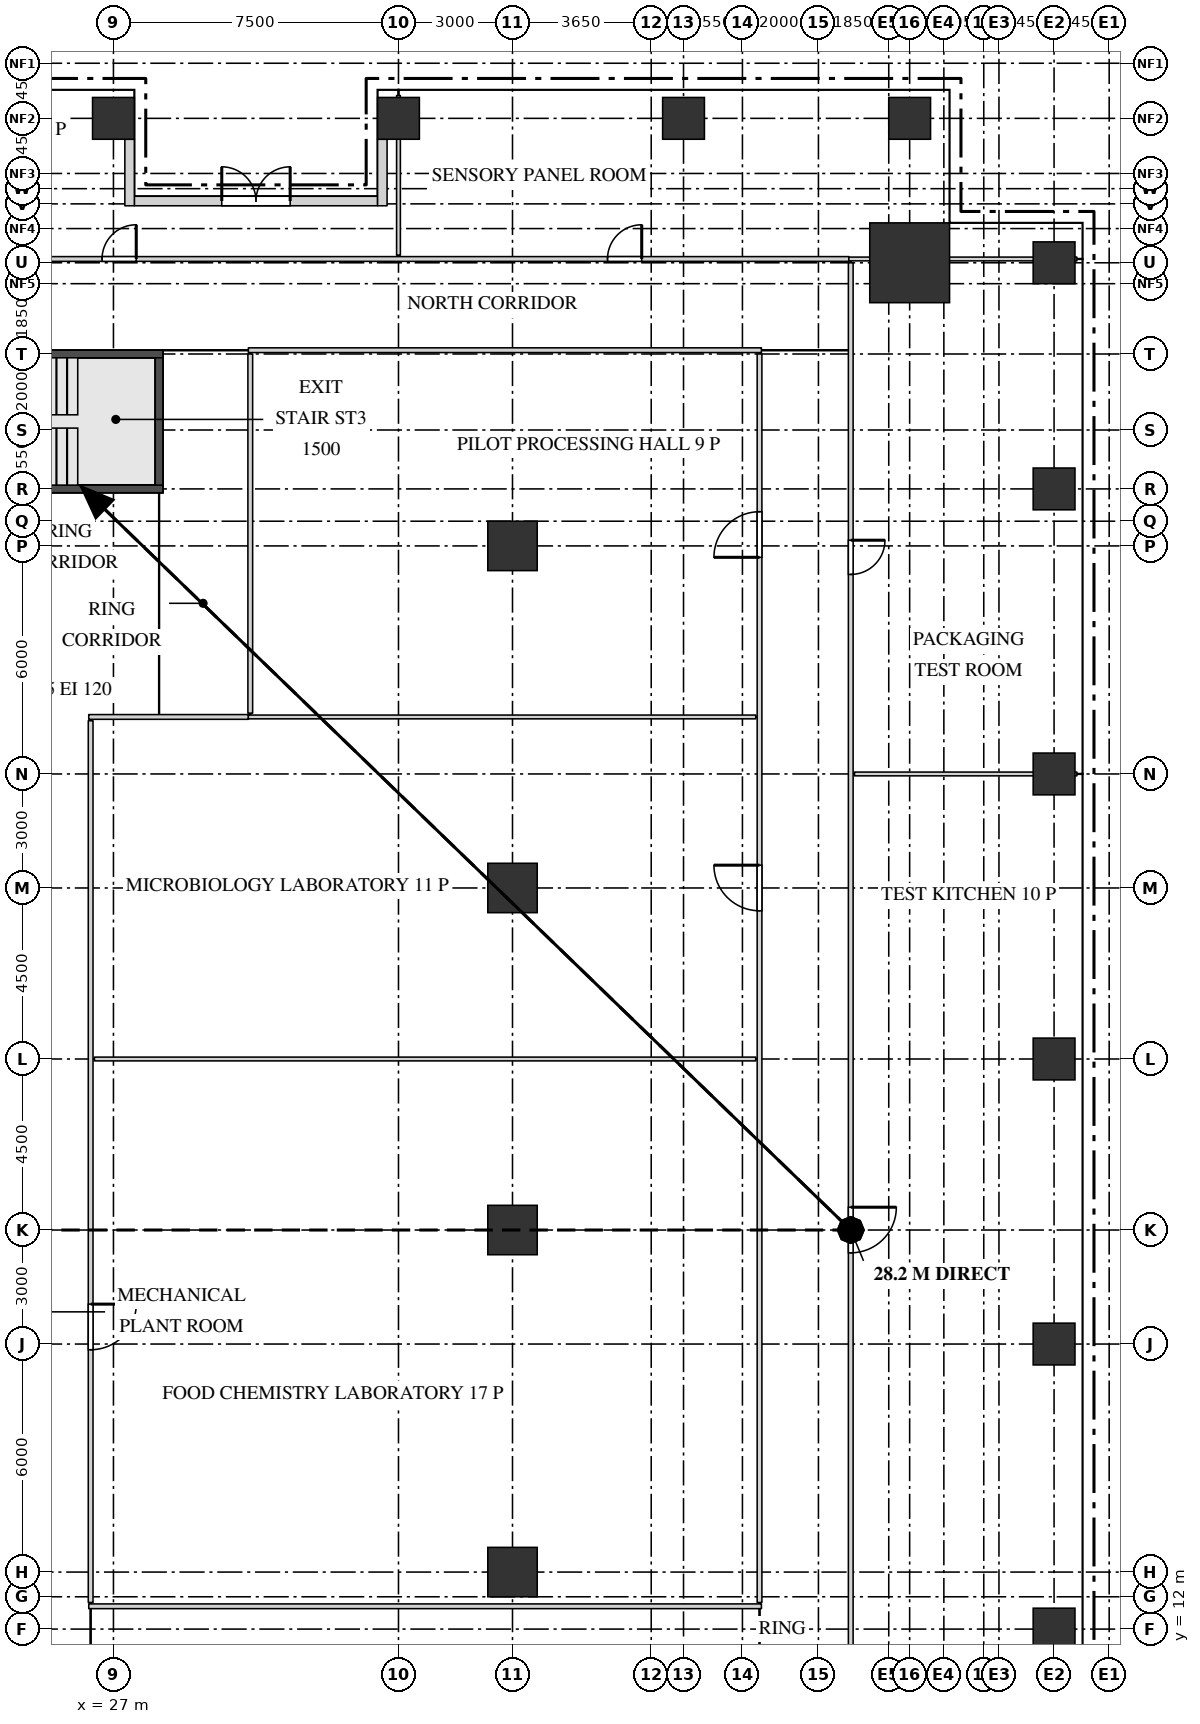
"""IFC4 building model, lengths in metres.
Left out: names, types, materials, properties, quantities, classifications, styles, units other than length and angle.
Written with IfcOpenShell. Run it as: python <this file> out.ifc"""

import sys

from ifc_helpers import new_model, si_unit, direction, frame, frame_2d, origin, origin_2d, place, context, subcontext, project, spatial, rectangle, extrude, source, transform, mapped, element, fill, save


model = new_model("IFC4")
c1 = context("Model", 3, precision=1e-05, world=origin(), true_north=direction((0.0, 1.0)))
c2 = subcontext(c1, "Body", "Model", "MODEL_VIEW")
j1 = project(units=[si_unit("LENGTHUNIT", "METRE"), si_unit("PLANEANGLEUNIT", "RADIAN")], contexts=[c1])
p1 = place(None, origin())
s1 = spatial("IfcSite", under=j1, at=p1, CompositionType="ELEMENT")
p2 = place(p1, origin())
s2 = spatial("IfcBuilding", under=s1, at=p2, CompositionType="ELEMENT")
p3 = place(p2, frame((0.0, 0.0, 114.7)))
s3 = spatial("IfcBuildingStorey", under=s2, at=p3, CompositionType="ELEMENT", Elevation=114.7)
m1 = source(origin(), c2, "Body", "SweptSolid", [
    extrude(rectangle(XDim=7.1, YDim=0.2, at=frame_2d((3.55, 0.0))), origin(), (0.0, 0.0, 1.0), 4.1),
])
p4 = place(p3, frame((21.2, 45.55, 0.0), z_axis=(0.0, 0.0, 1.0), x_axis=(1.0, 0.0, 0.0)))
e1 = element("IfcWall", 1, at=p4, inside=s3, PredefinedType="SHEAR", context=c2, shape_type="MappedRepresentation", body=[
    mapped(m1, transform((0.0, 0.0, 0.0))),
])
m2 = source(origin(), c2, "Body", "SweptSolid", [
    extrude(rectangle(XDim=1.2, YDim=2.1, at=frame_2d((0.6, 1.05))), frame((0.0, 0.11, 0.0), z_axis=(0.0, -1.0, 0.0), x_axis=(1.0, 0.0, 0.0)), (0.0, 0.0, 1.0), 0.22),
])
p5 = place(p4, frame((0.15, 0.0, 0.0)))
e2 = element("IfcOpeningElement", 2, at=p5, cuts=e1, PredefinedType="OPENING", context=c2, shape_type="MappedRepresentation", body=[
    mapped(m2, transform((0.0, 0.0, 0.0))),
])
p6 = place(p3, frame((21.2, 42.0, 0.0), z_axis=(0.0, 0.0, 1.0), x_axis=(1.0, 0.0, 0.0)))
e3 = element("IfcWall", 3, at=p6, inside=s3, PredefinedType="SHEAR", context=c2, shape_type="MappedRepresentation", body=[
    mapped(m1, transform((0.0, 0.0, 0.0))),
])
m3 = source(origin(), c2, "Body", "SweptSolid", [
    extrude(rectangle(XDim=3.35, YDim=0.2, at=frame_2d((1.675, 0.0))), origin(), (0.0, 0.0, 1.0), 4.1),
])
p7 = place(p3, frame((28.2, 42.1, 0.0), z_axis=(0.0, 0.0, 1.0), x_axis=(0.0, 1.0, 0.0)))
e4 = element("IfcWall", 4, at=p7, inside=s3, PredefinedType="SHEAR", context=c2, shape_type="MappedRepresentation", body=[
    mapped(m3, transform((0.0, 0.0, 0.0))),
])
m4 = source(origin(), c2, "Body", "SweptSolid", [
    extrude(rectangle(XDim=2.1, YDim=2.1, at=origin_2d()), origin(), (0.0, 0.0, 1.0), 4.4),
])
p8 = place(p3, frame((47.95, 47.95, 0.0), z_axis=(0.0, 0.0, 1.0), x_axis=(1.0, 0.0, 0.0)))
e5 = element("IfcColumn", 5, at=p8, inside=s3, PredefinedType="COLUMN", context=c2, shape_type="MappedRepresentation", body=[
    mapped(m4, transform((0.0, 0.0, 0.0))),
])
m5 = source(origin(), c2, "Body", "SweptSolid", [
    extrude(rectangle(XDim=1.1, YDim=1.1, at=origin_2d()), origin(), (0.0, 0.0, 1.0), 4.1),
])
for number, where, z_axis, x_axis in (
    (6, (51.75, 12.0, 0.0), (0.0, 0.0, 1.0), (1.0, 0.0, 0.0)),
    (7, (51.75, 19.5, 0.0), (0.0, 0.0, 1.0), (1.0, 0.0, 0.0)),
    (8, (51.75, 27.0, 0.0), (0.0, 0.0, 1.0), (1.0, 0.0, 0.0)),
    (9, (51.75, 34.5, 0.0), (0.0, 0.0, 1.0), (1.0, 0.0, 0.0)),
    (10, (51.75, 42.0, 0.0), (0.0, 0.0, 1.0), (1.0, 0.0, 0.0)),
    (11, (51.75, 47.95, 0.0), (0.0, 0.0, 1.0), (1.0, 0.0, 0.0)),
    (12, (27.0, 51.75, 0.0), (0.0, 0.0, 1.0), (1.0, 0.0, 0.0)),
    (13, (34.5, 51.75, 0.0), (0.0, 0.0, 1.0), (1.0, 0.0, 0.0)),
    (14, (42.0, 51.75, 0.0), (0.0, 0.0, 1.0), (1.0, 0.0, 0.0)),
    (15, (47.95, 51.75, 0.0), (0.0, 0.0, 1.0), (1.0, 0.0, 0.0)),
):
    element("IfcColumn", number, at=place(p3, frame(where, z_axis=z_axis, x_axis=x_axis)), inside=s3, PredefinedType="COLUMN", context=c2, shape_type="MappedRepresentation", body=[
        mapped(m5, transform((0.0, 0.0, 0.0))),
    ])
m6 = source(origin(), c2, "Body", "SweptSolid", [
    extrude(rectangle(XDim=1.3, YDim=1.3, at=origin_2d()), origin(), (0.0, 0.0, 1.0), 4.1),
])
for number, where, z_axis, x_axis in (
    (16, (37.5, 13.5, 0.0), (0.0, 0.0, 1.0), (1.0, 0.0, 0.0)),
    (17, (37.5, 22.5, 0.0), (0.0, 0.0, 1.0), (1.0, 0.0, 0.0)),
    (18, (37.5, 31.5, 0.0), (0.0, 0.0, 1.0), (1.0, 0.0, 0.0)),
    (19, (37.5, 40.5, 0.0), (0.0, 0.0, 1.0), (1.0, 0.0, 0.0)),
):
    element("IfcColumn", number, at=place(p3, frame(where, z_axis=z_axis, x_axis=x_axis)), inside=s3, PredefinedType="COLUMN", context=c2, shape_type="MappedRepresentation", body=[
        mapped(m6, transform((0.0, 0.0, 0.0))),
    ])
m7 = source(origin(), c2, "Body", "SweptSolid", [
    extrude(rectangle(XDim=6.4, YDim=0.25, at=frame_2d((3.2, 0.0))), origin(), (0.0, 0.0, 1.0), 4.1),
])
p9 = place(p3, frame((27.55, 49.575, 0.0), z_axis=(0.0, 0.0, 1.0), x_axis=(1.0, 0.0, 0.0)))
e20 = element("IfcWall", 20, at=p9, inside=s3, PredefinedType="SOLIDWALL", context=c2, shape_type="MappedRepresentation", body=[
    mapped(m7, transform((0.0, 0.0, 0.0))),
])
m8 = source(origin(), c2, "Body", "SweptSolid", [
    extrude(rectangle(XDim=1.65, YDim=2.4, at=frame_2d((0.825, 1.2))), frame((0.0, 0.135, 0.0), z_axis=(0.0, -1.0, 0.0), x_axis=(1.0, 0.0, 0.0)), (0.0, 0.0, 1.0), 0.27),
])
p10 = place(p9, frame((0.35, 0.0, 0.0)))
e21 = element("IfcOpeningElement", 21, at=p10, cuts=e20, PredefinedType="OPENING", context=c2, shape_type="MappedRepresentation", body=[
    mapped(m8, transform((0.0, 0.0, 0.0))),
])
p11 = place(p9, frame((4.4, 0.0, 0.0)))
e22 = element("IfcOpeningElement", 22, at=p11, cuts=e20, PredefinedType="OPENING", context=c2, shape_type="MappedRepresentation", body=[
    mapped(m8, transform((0.0, 0.0, 0.0))),
])
m9 = source(origin(), c2, "Body", "SweptSolid", [
    extrude(rectangle(XDim=1.8, YDim=2.4, at=frame_2d((0.9, 1.2))), frame((0.0, 0.135, 0.0), z_axis=(0.0, -1.0, 0.0), x_axis=(1.0, 0.0, 0.0)), (0.0, 0.0, 1.0), 0.27),
])
p12 = place(p9, frame((2.3, 0.0, 0.0)))
e23 = element("IfcOpeningElement", 23, at=p12, cuts=e20, PredefinedType="OPENING", context=c2, shape_type="MappedRepresentation", body=[
    mapped(m9, transform((0.0, 0.0, 0.0))),
])
m10 = source(origin(), c2, "Body", "SweptSolid", [
    extrude(rectangle(XDim=1.75, YDim=0.25, at=frame_2d((0.875, 0.0))), origin(), (0.0, 0.0, 1.0), 3.8),
])
for number, where, z_axis, x_axis in (
    (24, (27.425, 51.2, 0.0), (0.0, 0.0, 1.0), (0.0, -1.0, 0.0)),
    (25, (34.075, 51.2, 0.0), (0.0, 0.0, 1.0), (0.0, -1.0, 0.0)),
):
    element("IfcWall", number, at=place(p3, frame(where, z_axis=z_axis, x_axis=x_axis)), inside=s3, PredefinedType="SOLIDWALL", context=c2, shape_type="MappedRepresentation", body=[
        mapped(m10, transform((0.0, 0.0, 0.0))),
    ])
m11 = source(origin(), c2, "Body", "SweptSolid", [
    extrude(rectangle(XDim=37.65, YDim=0.125, at=frame_2d((18.825, 0.0))), origin(), (0.0, 0.0, 1.0), 4.2),
])
p13 = place(p3, frame((46.4, 10.3, 0.0), z_axis=(0.0, 0.0, 1.0), x_axis=(0.0, 1.0, 0.0)))
e26 = element("IfcWall", 26, at=p13, inside=s3, PredefinedType="PARTITIONING", context=c2, shape_type="MappedRepresentation", body=[
    mapped(m11, transform((0.0, 0.0, 0.0))),
])
m12 = source(origin(), c2, "Body", "SweptSolid", [
    extrude(rectangle(XDim=1.2, YDim=2.1, at=frame_2d((0.6, 1.05))), frame((0.0, 0.073, 0.0), z_axis=(0.0, -1.0, 0.0), x_axis=(1.0, 0.0, 0.0)), (0.0, 0.0, 1.0), 0.145),
])
p14 = place(p13, frame((11.6, 0.0, 0.0)))
e27 = element("IfcOpeningElement", 27, at=p14, cuts=e26, PredefinedType="OPENING", context=c2, shape_type="MappedRepresentation", body=[
    mapped(m12, transform((0.0, 0.0, 0.0))),
])
m13 = source(origin(), c2, "Body", "SweptSolid", [
    extrude(rectangle(XDim=0.9, YDim=2.1, at=frame_2d((0.45, 1.05))), frame((0.0, 0.073, 0.0), z_axis=(0.0, -1.0, 0.0), x_axis=(1.0, 0.0, 0.0)), (0.0, 0.0, 1.0), 0.145),
])
p15 = place(p13, frame((29.45, 0.0, 0.0)))
e28 = element("IfcOpeningElement", 28, at=p15, cuts=e26, PredefinedType="OPENING", context=c2, shape_type="MappedRepresentation", body=[
    mapped(m13, transform((0.0, 0.0, 0.0))),
])
m14 = source(origin(), c2, "Body", "SweptSolid", [
    extrude(rectangle(XDim=17.7, YDim=0.125, at=frame_2d((8.85, 0.0))), origin(), (0.0, 0.0, 1.0), 4.2),
])
p16 = place(p3, frame((26.35, 12.6, 0.0), z_axis=(0.0, 0.0, 1.0), x_axis=(1.0, 0.0, 0.0)))
e29 = element("IfcWall", 29, at=p16, inside=s3, PredefinedType="PARTITIONING", context=c2, shape_type="MappedRepresentation", body=[
    mapped(m14, transform((0.0, 0.0, 0.0))),
])
m15 = source(origin(), c2, "Body", "SweptSolid", [
    extrude(rectangle(XDim=23.2, YDim=0.125, at=frame_2d((11.6, 0.0))), origin(), (0.0, 0.0, 1.0), 4.2),
])
p17 = place(p3, frame((26.4, 12.7, 0.0), z_axis=(0.0, 0.0, 1.0), x_axis=(0.0, 1.0, 0.0)))
e30 = element("IfcWall", 30, at=p17, inside=s3, PredefinedType="PARTITIONING", context=c2, shape_type="MappedRepresentation", body=[
    mapped(m15, transform((0.0, 0.0, 0.0))),
])
p18 = place(p17, frame((6.65, 0.0, 0.0)))
e31 = element("IfcOpeningElement", 31, at=p18, cuts=e30, PredefinedType="OPENING", context=c2, shape_type="MappedRepresentation", body=[
    mapped(m12, transform((0.0, 0.0, 0.0))),
])
m16 = source(origin(), c2, "Body", "SweptSolid", [
    extrude(rectangle(XDim=32.85, YDim=0.125, at=frame_2d((16.425, 0.0))), origin(), (0.0, 0.0, 1.0), 4.2),
])
p19 = place(p3, frame((44.0, 12.7, 0.0), z_axis=(0.0, 0.0, 1.0), x_axis=(0.0, 1.0, 0.0)))
e32 = element("IfcWall", 32, at=p19, inside=s3, PredefinedType="PARTITIONING", context=c2, shape_type="MappedRepresentation", body=[
    mapped(m16, transform((0.0, 0.0, 0.0))),
])
p20 = place(p19, frame((18.2, 0.0, 0.0)))
e33 = element("IfcOpeningElement", 33, at=p20, cuts=e32, PredefinedType="OPENING", context=c2, shape_type="MappedRepresentation", body=[
    mapped(m12, transform((0.0, 0.0, 0.0))),
])
p21 = place(p19, frame((27.5, 0.0, 0.0)))
e34 = element("IfcOpeningElement", 34, at=p21, cuts=e32, PredefinedType="OPENING", context=c2, shape_type="MappedRepresentation", body=[
    mapped(m12, transform((0.0, 0.0, 0.0))),
])
m17 = source(origin(), c2, "Body", "SweptSolid", [
    extrude(rectangle(XDim=17.4, YDim=0.1, at=frame_2d((8.7, 0.0))), origin(), (0.0, 0.0, 1.0), 4.2),
])
p22 = place(p3, frame((26.5, 27.0, 0.0), z_axis=(0.0, 0.0, 1.0), x_axis=(1.0, 0.0, 0.0)))
e35 = element("IfcWall", 35, at=p22, inside=s3, PredefinedType="PARTITIONING", context=c2, shape_type="MappedRepresentation", body=[
    mapped(m17, transform((0.0, 0.0, 0.0))),
])
m18 = source(origin(), c2, "Body", "SweptSolid", [
    extrude(rectangle(XDim=5.85, YDim=0.1, at=frame_2d((2.925, 0.0))), origin(), (0.0, 0.0, 1.0), 4.2),
])
p23 = place(p3, frame((46.5, 34.5, 0.0), z_axis=(0.0, 0.0, 1.0), x_axis=(1.0, 0.0, 0.0)))
e36 = element("IfcWall", 36, at=p23, inside=s3, PredefinedType="PARTITIONING", context=c2, shape_type="MappedRepresentation", body=[
    mapped(m18, transform((0.0, 0.0, 0.0))),
])
m19 = source(origin(), c2, "Body", "SweptSolid", [
    extrude(rectangle(XDim=4.2, YDim=0.125, at=frame_2d((2.1, 0.0))), origin(), (0.0, 0.0, 1.0), 4.2),
])
p24 = place(p3, frame((26.35, 36.0, 0.0), z_axis=(0.0, 0.0, 1.0), x_axis=(1.0, 0.0, 0.0)))
e37 = element("IfcWall", 37, at=p24, inside=s3, PredefinedType="PARTITIONING", context=c2, shape_type="MappedRepresentation", body=[
    mapped(m19, transform((0.0, 0.0, 0.0))),
])
m20 = source(origin(), c2, "Body", "SweptSolid", [
    extrude(rectangle(XDim=13.35, YDim=0.1, at=frame_2d((6.675, 0.0))), origin(), (0.0, 0.0, 1.0), 4.2),
])
p25 = place(p3, frame((30.55, 36.0, 0.0), z_axis=(0.0, 0.0, 1.0), x_axis=(1.0, 0.0, 0.0)))
e38 = element("IfcWall", 38, at=p25, inside=s3, PredefinedType="PARTITIONING", context=c2, shape_type="MappedRepresentation", body=[
    mapped(m20, transform((0.0, 0.0, 0.0))),
])
m21 = source(origin(), c2, "Body", "SweptSolid", [
    extrude(rectangle(XDim=9.45, YDim=0.125, at=frame_2d((4.725, 0.0))), origin(), (0.0, 0.0, 1.0), 4.2),
])
p26 = place(p3, frame((30.6, 36.1, 0.0), z_axis=(0.0, 0.0, 1.0), x_axis=(0.0, 1.0, 0.0)))
e39 = element("IfcWall", 39, at=p26, inside=s3, PredefinedType="PARTITIONING", context=c2, shape_type="MappedRepresentation", body=[
    mapped(m21, transform((0.0, 0.0, 0.0))),
])
m22 = source(origin(), c2, "Body", "SweptSolid", [
    extrude(rectangle(XDim=13.5, YDim=0.125, at=frame_2d((6.75, 0.0))), origin(), (0.0, 0.0, 1.0), 4.2),
])
p27 = place(p3, frame((30.55, 45.65, 0.0), z_axis=(0.0, 0.0, 1.0), x_axis=(1.0, 0.0, 0.0)))
e40 = element("IfcWall", 40, at=p27, inside=s3, PredefinedType="PARTITIONING", context=c2, shape_type="MappedRepresentation", body=[
    mapped(m22, transform((0.0, 0.0, 0.0))),
])
m23 = source(origin(), c2, "Body", "SweptSolid", [
    extrude(rectangle(XDim=42.2, YDim=0.125, at=frame_2d((21.1, 0.0))), origin(), (0.0, 0.0, 1.0), 3.55),
])
p28 = place(p3, frame((4.15, 48.05, 0.0), z_axis=(0.0, 0.0, 1.0), x_axis=(1.0, 0.0, 0.0)))
e41 = element("IfcWall", 41, at=p28, inside=s3, PredefinedType="PARTITIONING", context=c2, shape_type="MappedRepresentation", body=[
    mapped(m23, transform((0.0, 0.0, 0.0))),
])
p29 = place(p28, frame((7.25, 0.0, 0.0)))
e42 = element("IfcOpeningElement", 42, at=p29, cuts=e41, PredefinedType="OPENING", context=c2, shape_type="MappedRepresentation", body=[
    mapped(m13, transform((0.0, 0.0, 0.0))),
])
p30 = place(p28, frame((22.55, 0.0, 0.0)))
e43 = element("IfcOpeningElement", 43, at=p30, cuts=e41, PredefinedType="OPENING", context=c2, shape_type="MappedRepresentation", body=[
    mapped(m13, transform((0.0, 0.0, 0.0))),
])
p31 = place(p28, frame((35.85, 0.0, 0.0)))
e44 = element("IfcOpeningElement", 44, at=p31, cuts=e41, PredefinedType="OPENING", context=c2, shape_type="MappedRepresentation", body=[
    mapped(m13, transform((0.0, 0.0, 0.0))),
])
m24 = source(origin(), c2, "Body", "SweptSolid", [
    extrude(rectangle(XDim=6.0, YDim=0.1, at=frame_2d((3.0, 0.0))), origin(), (0.0, 0.0, 1.0), 3.55),
])
p32 = place(p3, frame((46.35, 48.05, 0.0), z_axis=(0.0, 0.0, 1.0), x_axis=(1.0, 0.0, 0.0)))
e45 = element("IfcWall", 45, at=p32, inside=s3, PredefinedType="PARTITIONING", context=c2, shape_type="MappedRepresentation", body=[
    mapped(m24, transform((0.0, 0.0, 0.0))),
])
m25 = source(origin(), c2, "Body", "SweptSolid", [
    extrude(rectangle(XDim=4.2, YDim=0.1, at=frame_2d((2.1, 0.0))), origin(), (0.0, 0.0, 1.0), 3.6),
])
p33 = place(p3, frame((34.5, 48.15, 0.0), z_axis=(0.0, 0.0, 1.0), x_axis=(0.0, 1.0, 0.0)))
e46 = element("IfcWall", 46, at=p33, inside=s3, PredefinedType="PARTITIONING", context=c2, shape_type="MappedRepresentation", body=[
    mapped(m25, transform((0.0, 0.0, 0.0))),
])
m26 = source(origin(), c2, "Body", "SweptSolid", [
    extrude(rectangle(XDim=1.65, YDim=2.4, at=frame_2d((0.825, 1.2))), frame((0.0, 0.03, 0.0), z_axis=(0.0, -1.0, 0.0), x_axis=(1.0, 0.0, 0.0)), (0.0, 0.0, 1.0), 0.06),
])
p34 = place(p10, origin())
e47 = element("IfcWindow", 47, at=p34, inside=s3, PartitioningType="SINGLE_PANEL", PredefinedType="WINDOW", context=c2, shape_type="MappedRepresentation", body=[
    mapped(m26, transform((0.0, 0.0, 0.0))),
])
fill(e21, e47)
p35 = place(p11, origin())
e48 = element("IfcWindow", 48, at=p35, inside=s3, PartitioningType="SINGLE_PANEL", PredefinedType="WINDOW", context=c2, shape_type="MappedRepresentation", body=[
    mapped(m26, transform((0.0, 0.0, 0.0))),
])
fill(e22, e48)
m27 = source(origin(), c2, "Body", "SweptSolid", [
    extrude(rectangle(XDim=1.8, YDim=2.4, at=frame_2d((0.9, 1.2))), frame((0.0, 0.025, 0.0), z_axis=(0.0, -1.0, 0.0), x_axis=(1.0, 0.0, 0.0)), (0.0, 0.0, 1.0), 0.05),
])
p36 = place(p12, origin())
e49 = element("IfcDoor", 49, at=p36, inside=s3, OperationType="DOUBLE_DOOR_DOUBLE_SWING", PredefinedType="DOOR", context=c2, shape_type="MappedRepresentation", body=[
    mapped(m27, transform((0.0, 0.0, 0.0))),
])
fill(e23, e49)
m28 = source(origin(), c2, "Body", "SweptSolid", [
    extrude(rectangle(XDim=1.2, YDim=2.1, at=frame_2d((0.6, 1.05))), frame((0.0, 0.025, 0.0), z_axis=(0.0, -1.0, 0.0), x_axis=(1.0, 0.0, 0.0)), (0.0, 0.0, 1.0), 0.05),
])
p37 = place(p18, origin())
e50 = element("IfcDoor", 50, at=p37, inside=s3, OperationType="SINGLE_SWING_RIGHT", PredefinedType="DOOR", context=c2, shape_type="MappedRepresentation", body=[
    mapped(m28, transform((0.0, 0.0, 0.0))),
])
fill(e31, e50)
p38 = place(p20, origin())
e51 = element("IfcDoor", 51, at=p38, inside=s3, OperationType="SINGLE_SWING_LEFT", PredefinedType="DOOR", context=c2, shape_type="MappedRepresentation", body=[
    mapped(m28, transform((0.0, 0.0, 0.0))),
])
fill(e33, e51)
p39 = place(p21, origin())
e52 = element("IfcDoor", 52, at=p39, inside=s3, OperationType="SINGLE_SWING_RIGHT", PredefinedType="DOOR", context=c2, shape_type="MappedRepresentation", body=[
    mapped(m28, transform((0.0, 0.0, 0.0))),
])
fill(e34, e52)
p40 = place(p14, origin())
e53 = element("IfcDoor", 53, at=p40, inside=s3, OperationType="SINGLE_SWING_RIGHT", PredefinedType="DOOR", context=c2, shape_type="MappedRepresentation", body=[
    mapped(m28, transform((0.0, 0.0, 0.0))),
])
fill(e27, e53)
m29 = source(origin(), c2, "Body", "SweptSolid", [
    extrude(rectangle(XDim=0.9, YDim=2.1, at=frame_2d((0.45, 1.05))), frame((0.0, 0.025, 0.0), z_axis=(0.0, -1.0, 0.0), x_axis=(1.0, 0.0, 0.0)), (0.0, 0.0, 1.0), 0.05),
])
p41 = place(p15, origin())
e54 = element("IfcDoor", 54, at=p41, inside=s3, OperationType="SINGLE_SWING_RIGHT", PredefinedType="DOOR", context=c2, shape_type="MappedRepresentation", body=[
    mapped(m29, transform((0.0, 0.0, 0.0))),
])
fill(e28, e54)
p42 = place(p30, origin())
e55 = element("IfcDoor", 55, at=p42, inside=s3, OperationType="SINGLE_SWING_LEFT", PredefinedType="DOOR", context=c2, shape_type="MappedRepresentation", body=[
    mapped(m29, transform((0.0, 0.0, 0.0))),
])
fill(e43, e55)
p43 = place(p31, origin())
e56 = element("IfcDoor", 56, at=p43, inside=s3, OperationType="SINGLE_SWING_LEFT", PredefinedType="DOOR", context=c2, shape_type="MappedRepresentation", body=[
    mapped(m29, transform((0.0, 0.0, 0.0))),
])
fill(e44, e56)
save(model, sys.argv[1])
